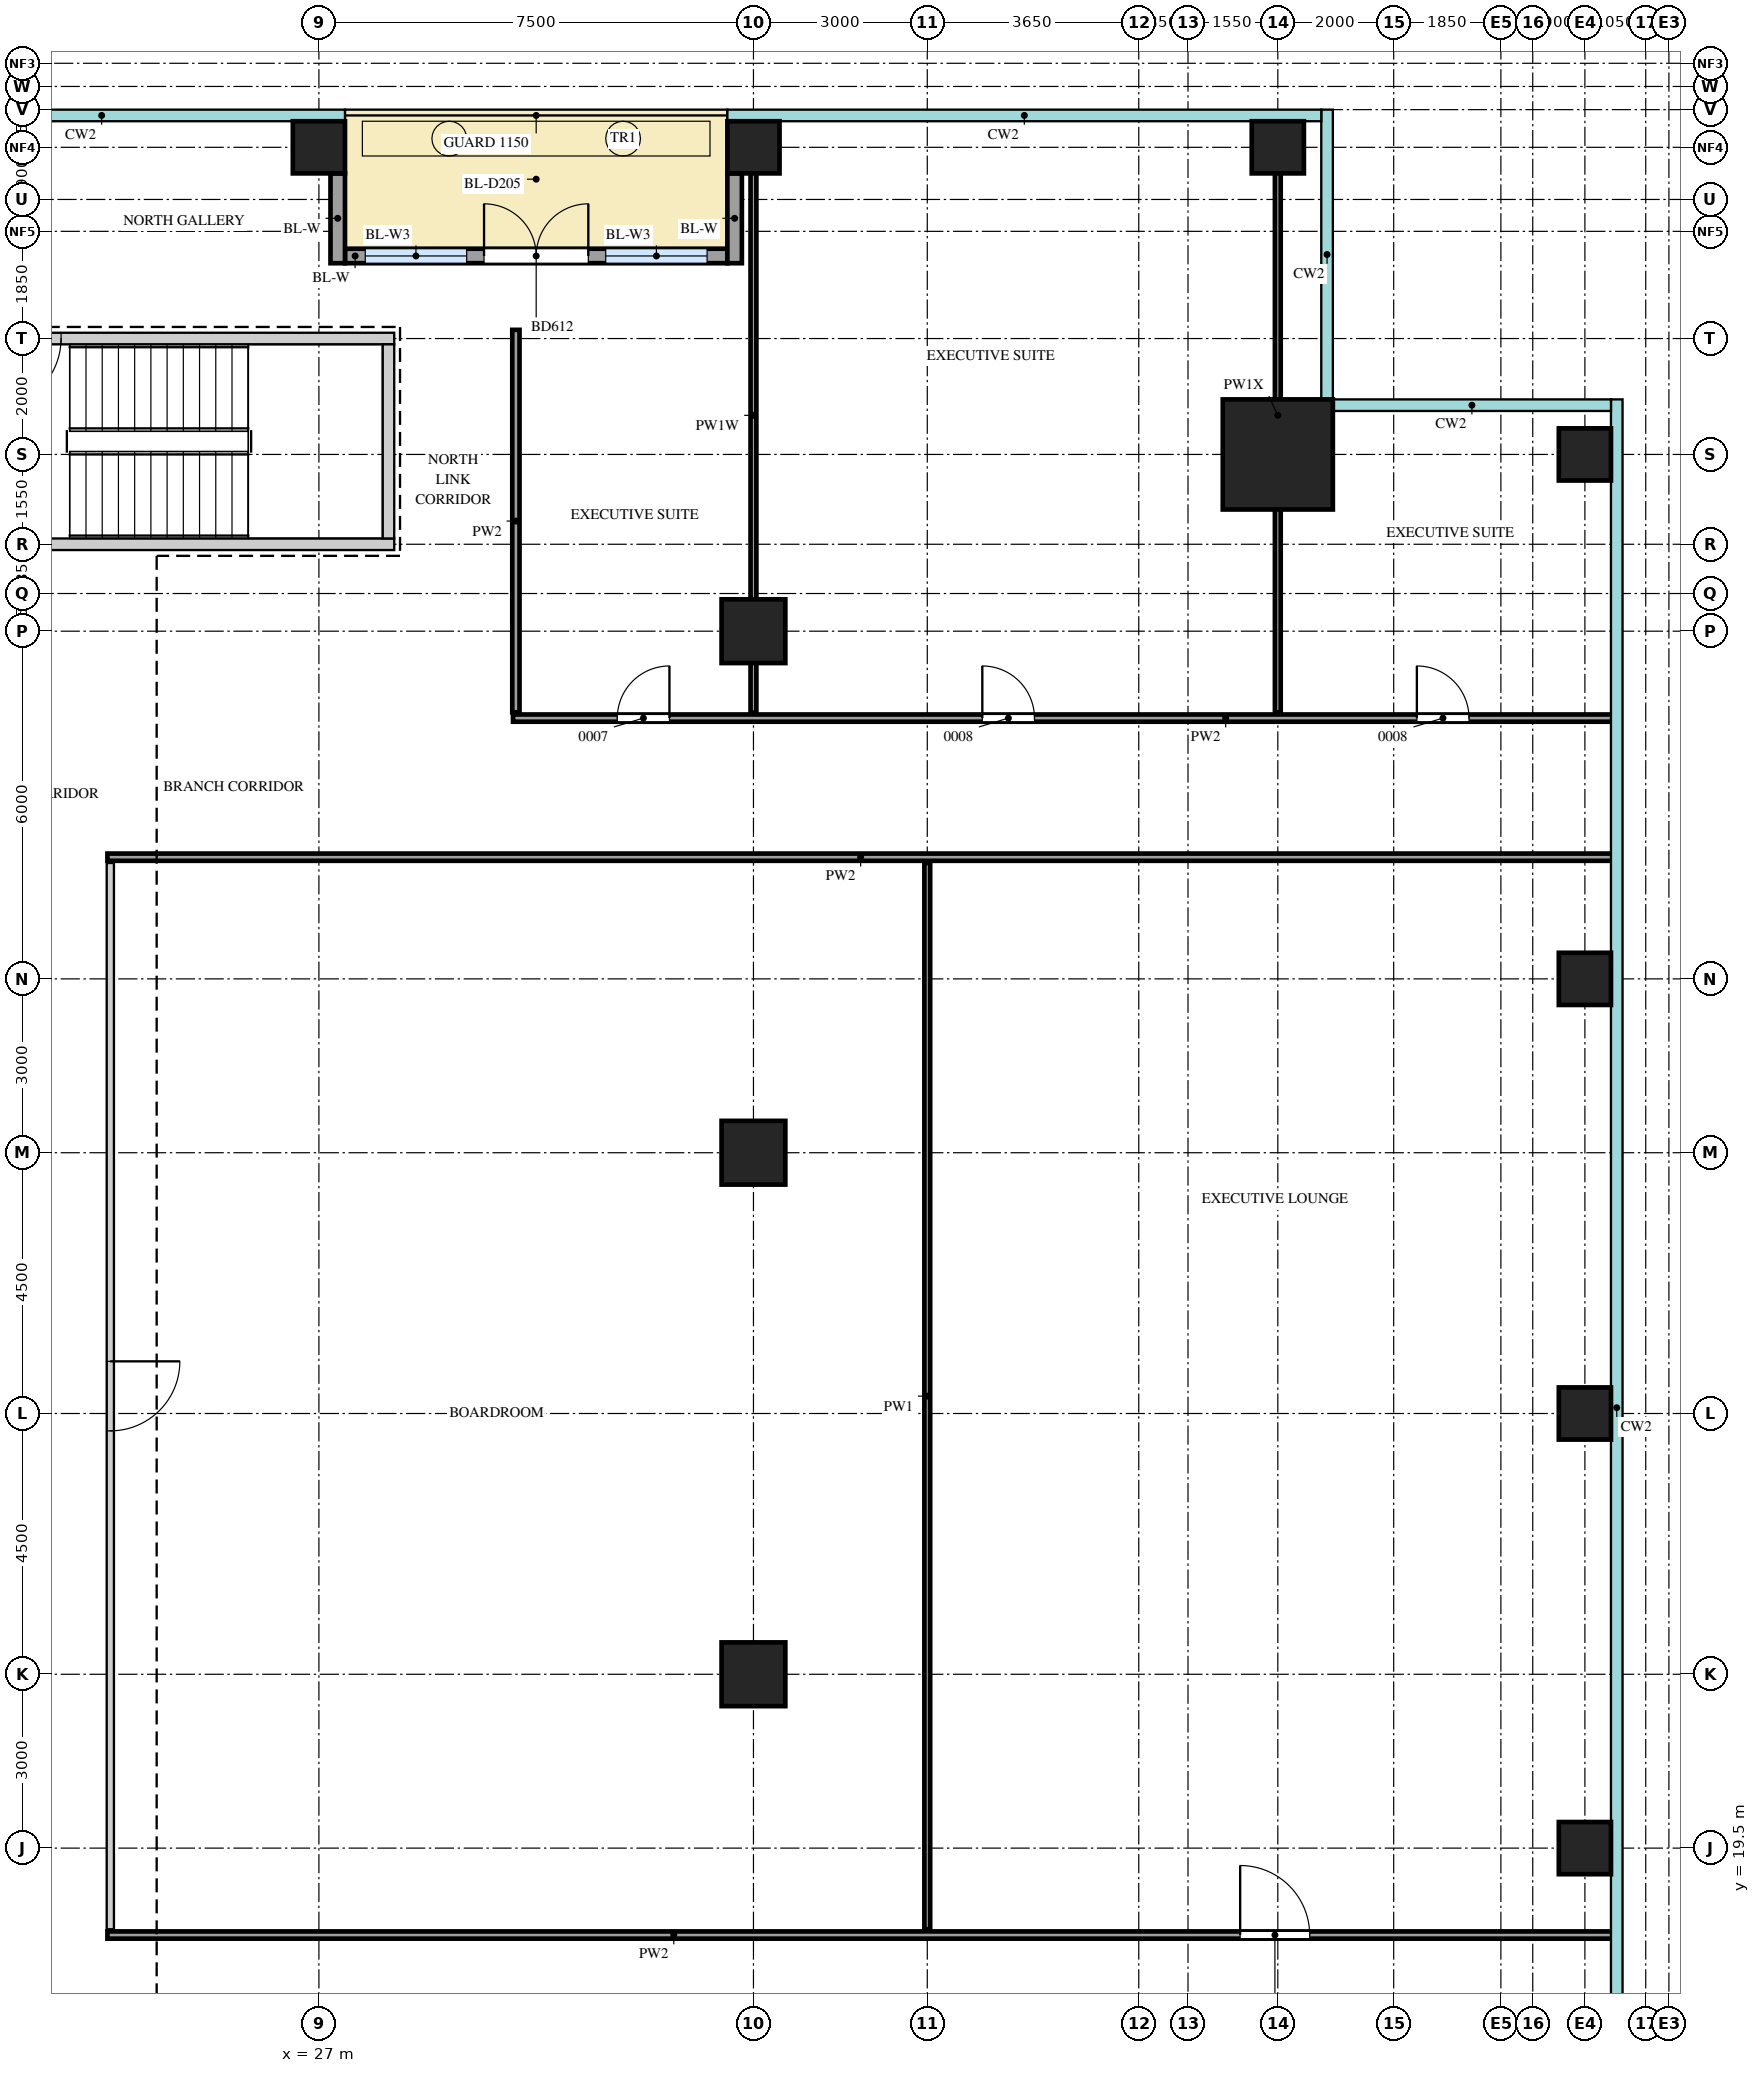
"""IFC4 building model, lengths in metres.
Left out: names, types, materials, properties, quantities, classifications, styles, units other than length and angle.
Written with IfcOpenShell. Run it as: python <this file> out.ifc"""

import sys

from ifc_helpers import new_model, si_unit, direction, frame, frame_2d, origin, origin_2d, place, context, subcontext, project, spatial, rectangle, extrude, source, transform, mapped, element, fill, save


model = new_model("IFC4")
c1 = context("Model", 3, precision=1e-05, world=origin(), true_north=direction((0.0, 1.0)))
c2 = subcontext(c1, "Body", "Model", "MODEL_VIEW")
j1 = project(units=[si_unit("LENGTHUNIT", "METRE"), si_unit("PLANEANGLEUNIT", "RADIAN")], contexts=[c1])
p1 = place(None, origin())
s1 = spatial("IfcSite", under=j1, at=p1, CompositionType="ELEMENT")
p2 = place(p1, origin())
s2 = spatial("IfcBuilding", under=s1, at=p2, CompositionType="ELEMENT")
p3 = place(p2, frame((0.0, 0.0, 270.2)))
s3 = spatial("IfcBuildingStorey", under=s2, at=p3, CompositionType="ELEMENT", Elevation=270.2)
m1 = source(origin(), c2, "Body", "SweptSolid", [
    extrude(rectangle(XDim=7.1, YDim=0.2, at=frame_2d((3.55, 0.0))), origin(), (0.0, 0.0, 1.0), 3.75),
])
p4 = place(p3, frame((21.2, 45.55, 0.0), z_axis=(0.0, 0.0, 1.0), x_axis=(1.0, 0.0, 0.0)))
e1 = element("IfcWall", 1, at=p4, inside=s3, PredefinedType="SHEAR", context=c2, shape_type="MappedRepresentation", body=[
    mapped(m1, transform((0.0, 0.0, 0.0))),
])
m2 = source(origin(), c2, "Body", "SweptSolid", [
    extrude(rectangle(XDim=1.2, YDim=2.1, at=frame_2d((0.6, 1.05))), frame((0.0, 0.11, 0.0), z_axis=(0.0, -1.0, 0.0), x_axis=(1.0, 0.0, 0.0)), (0.0, 0.0, 1.0), 0.22),
])
p5 = place(p4, frame((0.15, 0.0, 0.0)))
e2 = element("IfcOpeningElement", 2, at=p5, cuts=e1, PredefinedType="OPENING", context=c2, shape_type="MappedRepresentation", body=[
    mapped(m2, transform((0.0, 0.0, 0.0))),
])
p6 = place(p3, frame((21.2, 42.0, 0.0), z_axis=(0.0, 0.0, 1.0), x_axis=(1.0, 0.0, 0.0)))
e3 = element("IfcWall", 3, at=p6, inside=s3, PredefinedType="SHEAR", context=c2, shape_type="MappedRepresentation", body=[
    mapped(m1, transform((0.0, 0.0, 0.0))),
])
m3 = source(origin(), c2, "Body", "SweptSolid", [
    extrude(rectangle(XDim=3.35, YDim=0.2, at=frame_2d((1.675, 0.0))), origin(), (0.0, 0.0, 1.0), 3.75),
])
p7 = place(p3, frame((28.2, 42.1, 0.0), z_axis=(0.0, 0.0, 1.0), x_axis=(0.0, 1.0, 0.0)))
e4 = element("IfcWall", 4, at=p7, inside=s3, PredefinedType="SHEAR", context=c2, shape_type="MappedRepresentation", body=[
    mapped(m3, transform((0.0, 0.0, 0.0))),
])
m4 = source(origin(), c2, "Body", "SweptSolid", [
    extrude(rectangle(XDim=1.9, YDim=1.9, at=origin_2d()), origin(), (0.0, 0.0, 1.0), 4.0),
])
p8 = place(p3, frame((43.55, 43.55, 0.0), z_axis=(0.0, 0.0, 1.0), x_axis=(1.0, 0.0, 0.0)))
e5 = element("IfcColumn", 5, at=p8, inside=s3, PredefinedType="COLUMN", context=c2, shape_type="MappedRepresentation", body=[
    mapped(m4, transform((0.0, 0.0, 0.0))),
])
m5 = source(origin(), c2, "Body", "SweptSolid", [
    extrude(rectangle(XDim=0.9, YDim=0.9, at=origin_2d()), origin(), (0.0, 0.0, 1.0), 4.0),
])
for number, where, z_axis, x_axis in (
    (6, (48.85, 19.5, 0.0), (0.0, 0.0, 1.0), (1.0, 0.0, 0.0)),
    (7, (48.85, 27.0, 0.0), (0.0, 0.0, 1.0), (1.0, 0.0, 0.0)),
    (8, (48.85, 34.5, 0.0), (0.0, 0.0, 1.0), (1.0, 0.0, 0.0)),
    (9, (48.85, 43.55, 0.0), (0.0, 0.0, 1.0), (1.0, 0.0, 0.0)),
    (10, (27.0, 48.85, 0.0), (0.0, 0.0, 1.0), (1.0, 0.0, 0.0)),
    (11, (34.5, 48.85, 0.0), (0.0, 0.0, 1.0), (1.0, 0.0, 0.0)),
    (12, (43.55, 48.85, 0.0), (0.0, 0.0, 1.0), (1.0, 0.0, 0.0)),
):
    element("IfcColumn", number, at=place(p3, frame(where, z_axis=z_axis, x_axis=x_axis)), inside=s3, PredefinedType="COLUMN", context=c2, shape_type="MappedRepresentation", body=[
        mapped(m5, transform((0.0, 0.0, 0.0))),
    ])
m6 = source(origin(), c2, "Body", "SweptSolid", [
    extrude(rectangle(XDim=1.1, YDim=1.1, at=origin_2d()), origin(), (0.0, 0.0, 1.0), 4.0),
])
for number, where, z_axis, x_axis in (
    (13, (34.5, 22.5, 0.0), (0.0, 0.0, 1.0), (1.0, 0.0, 0.0)),
    (14, (34.5, 31.5, 0.0), (0.0, 0.0, 1.0), (1.0, 0.0, 0.0)),
    (15, (34.5, 40.5, 0.0), (0.0, 0.0, 1.0), (1.0, 0.0, 0.0)),
):
    element("IfcColumn", number, at=place(p3, frame(where, z_axis=z_axis, x_axis=x_axis)), inside=s3, PredefinedType="COLUMN", context=c2, shape_type="MappedRepresentation", body=[
        mapped(m6, transform((0.0, 0.0, 0.0))),
    ])
m7 = source(origin(), c2, "Body", "SweptSolid", [
    extrude(rectangle(XDim=6.6, YDim=0.25, at=frame_2d((3.3, 0.0))), origin(), (0.0, 0.0, 1.0), 3.75),
])
p9 = place(p3, frame((27.45, 46.975, 0.0), z_axis=(0.0, 0.0, 1.0), x_axis=(1.0, 0.0, 0.0)))
e16 = element("IfcWall", 16, at=p9, inside=s3, PredefinedType="SOLIDWALL", context=c2, shape_type="MappedRepresentation", body=[
    mapped(m7, transform((0.0, 0.0, 0.0))),
])
m8 = source(origin(), c2, "Body", "SweptSolid", [
    extrude(rectangle(XDim=1.75, YDim=2.4, at=frame_2d((0.875, 1.2))), frame((0.0, 0.135, 0.0), z_axis=(0.0, -1.0, 0.0), x_axis=(1.0, 0.0, 0.0)), (0.0, 0.0, 1.0), 0.27),
])
p10 = place(p9, frame((0.35, 0.0, 0.0)))
e17 = element("IfcOpeningElement", 17, at=p10, cuts=e16, PredefinedType="OPENING", context=c2, shape_type="MappedRepresentation", body=[
    mapped(m8, transform((0.0, 0.0, 0.0))),
])
p11 = place(p9, frame((4.5, 0.0, 0.0)))
e18 = element("IfcOpeningElement", 18, at=p11, cuts=e16, PredefinedType="OPENING", context=c2, shape_type="MappedRepresentation", body=[
    mapped(m8, transform((0.0, 0.0, 0.0))),
])
m9 = source(origin(), c2, "Body", "SweptSolid", [
    extrude(rectangle(XDim=1.8, YDim=2.4, at=frame_2d((0.9, 1.2))), frame((0.0, 0.135, 0.0), z_axis=(0.0, -1.0, 0.0), x_axis=(1.0, 0.0, 0.0)), (0.0, 0.0, 1.0), 0.27),
])
p12 = place(p9, frame((2.4, 0.0, 0.0)))
e19 = element("IfcOpeningElement", 19, at=p12, cuts=e16, PredefinedType="OPENING", context=c2, shape_type="MappedRepresentation", body=[
    mapped(m9, transform((0.0, 0.0, 0.0))),
])
m10 = source(origin(), c2, "Body", "SweptSolid", [
    extrude(rectangle(XDim=1.55, YDim=0.25, at=frame_2d((0.775, 0.0))), origin(), (0.0, 0.0, 1.0), 3.75),
])
for number, where, z_axis, x_axis in (
    (20, (27.325, 48.4, 0.0), (0.0, 0.0, 1.0), (0.0, -1.0, 0.0)),
    (21, (34.175, 48.4, 0.0), (0.0, 0.0, 1.0), (0.0, -1.0, 0.0)),
):
    element("IfcWall", number, at=place(p3, frame(where, z_axis=z_axis, x_axis=x_axis)), inside=s3, PredefinedType="SOLIDWALL", context=c2, shape_type="MappedRepresentation", body=[
        mapped(m10, transform((0.0, 0.0, 0.0))),
    ])
m11 = source(origin(), c2, "Body", "SweptSolid", [
    extrude(rectangle(XDim=26.0, YDim=0.125, at=frame_2d((13.0, 0.0))), origin(), (0.0, 0.0, 1.0), 3.8),
])
p13 = place(p3, frame((23.35, 18.0, 0.0), z_axis=(0.0, 0.0, 1.0), x_axis=(1.0, 0.0, 0.0)))
e22 = element("IfcWall", 22, at=p13, inside=s3, PredefinedType="PARTITIONING", context=c2, shape_type="MappedRepresentation", body=[
    mapped(m11, transform((0.0, 0.0, 0.0))),
])
m12 = source(origin(), c2, "Body", "SweptSolid", [
    extrude(rectangle(XDim=1.2, YDim=2.1, at=frame_2d((0.6, 1.05))), frame((0.0, 0.073, 0.0), z_axis=(0.0, -1.0, 0.0), x_axis=(1.0, 0.0, 0.0)), (0.0, 0.0, 1.0), 0.145),
])
p14 = place(p13, frame((19.55, 0.0, 0.0)))
e23 = element("IfcOpeningElement", 23, at=p14, cuts=e22, PredefinedType="OPENING", context=c2, shape_type="MappedRepresentation", body=[
    mapped(m12, transform((0.0, 0.0, 0.0))),
])
m13 = source(origin(), c2, "Body", "SweptSolid", [
    extrude(rectangle(XDim=18.4, YDim=0.125, at=frame_2d((9.2, 0.0))), origin(), (0.0, 0.0, 1.0), 3.8),
])
p15 = place(p3, frame((23.4, 18.1, 0.0), z_axis=(0.0, 0.0, 1.0), x_axis=(0.0, 1.0, 0.0)))
e24 = element("IfcWall", 24, at=p15, inside=s3, PredefinedType="PARTITIONING", context=c2, shape_type="MappedRepresentation", body=[
    mapped(m13, transform((0.0, 0.0, 0.0))),
])
p16 = place(p15, frame((8.6, 0.0, 0.0)))
e25 = element("IfcOpeningElement", 25, at=p16, cuts=e24, PredefinedType="OPENING", context=c2, shape_type="MappedRepresentation", body=[
    mapped(m12, transform((0.0, 0.0, 0.0))),
])
m14 = source(origin(), c2, "Body", "SweptSolid", [
    extrude(rectangle(XDim=18.4, YDim=0.1, at=frame_2d((9.2, 0.0))), origin(), (0.0, 0.0, 1.0), 3.8),
])
p17 = place(p3, frame((37.5, 18.1, 0.0), z_axis=(0.0, 0.0, 1.0), x_axis=(0.0, 1.0, 0.0)))
e26 = element("IfcWall", 26, at=p17, inside=s3, PredefinedType="PARTITIONING", context=c2, shape_type="MappedRepresentation", body=[
    mapped(m14, transform((0.0, 0.0, 0.0))),
])
p18 = place(p3, frame((23.35, 36.6, 0.0), z_axis=(0.0, 0.0, 1.0), x_axis=(1.0, 0.0, 0.0)))
e27 = element("IfcWall", 27, at=p18, inside=s3, PredefinedType="PARTITIONING", context=c2, shape_type="MappedRepresentation", body=[
    mapped(m11, transform((0.0, 0.0, 0.0))),
])
m15 = source(origin(), c2, "Body", "SweptSolid", [
    extrude(rectangle(XDim=19.0, YDim=0.125, at=frame_2d((9.5, 0.0))), origin(), (0.0, 0.0, 1.0), 3.8),
])
p19 = place(p3, frame((30.35, 39.0, 0.0), z_axis=(0.0, 0.0, 1.0), x_axis=(1.0, 0.0, 0.0)))
e28 = element("IfcWall", 28, at=p19, inside=s3, PredefinedType="PARTITIONING", context=c2, shape_type="MappedRepresentation", body=[
    mapped(m15, transform((0.0, 0.0, 0.0))),
])
m16 = source(origin(), c2, "Body", "SweptSolid", [
    extrude(rectangle(XDim=0.9, YDim=2.1, at=frame_2d((0.45, 1.05))), frame((0.0, 0.073, 0.0), z_axis=(0.0, -1.0, 0.0), x_axis=(1.0, 0.0, 0.0)), (0.0, 0.0, 1.0), 0.145),
])
p20 = place(p19, frame((1.8, 0.0, 0.0)))
e29 = element("IfcOpeningElement", 29, at=p20, cuts=e28, PredefinedType="OPENING", context=c2, shape_type="MappedRepresentation", body=[
    mapped(m16, transform((0.0, 0.0, 0.0))),
])
p21 = place(p19, frame((8.1, 0.0, 0.0)))
e30 = element("IfcOpeningElement", 30, at=p21, cuts=e28, PredefinedType="OPENING", context=c2, shape_type="MappedRepresentation", body=[
    mapped(m16, transform((0.0, 0.0, 0.0))),
])
p22 = place(p19, frame((15.6, 0.0, 0.0)))
e31 = element("IfcOpeningElement", 31, at=p22, cuts=e28, PredefinedType="OPENING", context=c2, shape_type="MappedRepresentation", body=[
    mapped(m16, transform((0.0, 0.0, 0.0))),
])
m17 = source(origin(), c2, "Body", "SweptSolid", [
    extrude(rectangle(XDim=6.6, YDim=0.125, at=frame_2d((3.3, 0.0))), origin(), (0.0, 0.0, 1.0), 3.8),
])
p23 = place(p3, frame((30.4, 39.1, 0.0), z_axis=(0.0, 0.0, 1.0), x_axis=(0.0, 1.0, 0.0)))
e32 = element("IfcWall", 32, at=p23, inside=s3, PredefinedType="PARTITIONING", context=c2, shape_type="MappedRepresentation", body=[
    mapped(m17, transform((0.0, 0.0, 0.0))),
])
m18 = source(origin(), c2, "Body", "SweptSolid", [
    extrude(rectangle(XDim=10.25, YDim=0.1, at=frame_2d((5.125, 0.0))), origin(), (0.0, 0.0, 1.0), 3.2),
])
p24 = place(p3, frame((34.5, 39.1, 0.0), z_axis=(0.0, 0.0, 1.0), x_axis=(0.0, 1.0, 0.0)))
e33 = element("IfcWall", 33, at=p24, inside=s3, PredefinedType="PARTITIONING", context=c2, shape_type="MappedRepresentation", body=[
    mapped(m18, transform((0.0, 0.0, 0.0))),
])
m19 = source(origin(), c2, "Body", "SweptSolid", [
    extrude(rectangle(XDim=10.25, YDim=0.1, at=frame_2d((5.125, 0.0))), origin(), (0.0, 0.0, 1.0), 3.15),
])
p25 = place(p3, frame((43.55, 39.1, 0.0), z_axis=(0.0, 0.0, 1.0), x_axis=(0.0, 1.0, 0.0)))
e34 = element("IfcWall", 34, at=p25, inside=s3, PredefinedType="PARTITIONING", context=c2, shape_type="MappedRepresentation", body=[
    mapped(m19, transform((0.0, 0.0, 0.0))),
])
m20 = source(origin(), c2, "Body", "SweptSolid", [
    extrude(rectangle(XDim=1.75, YDim=2.4, at=frame_2d((0.875, 1.2))), frame((0.0, 0.03, 0.0), z_axis=(0.0, -1.0, 0.0), x_axis=(1.0, 0.0, 0.0)), (0.0, 0.0, 1.0), 0.06),
])
p26 = place(p10, origin())
e35 = element("IfcWindow", 35, at=p26, inside=s3, PartitioningType="SINGLE_PANEL", PredefinedType="WINDOW", context=c2, shape_type="MappedRepresentation", body=[
    mapped(m20, transform((0.0, 0.0, 0.0))),
])
fill(e17, e35)
p27 = place(p11, origin())
e36 = element("IfcWindow", 36, at=p27, inside=s3, PartitioningType="SINGLE_PANEL", PredefinedType="WINDOW", context=c2, shape_type="MappedRepresentation", body=[
    mapped(m20, transform((0.0, 0.0, 0.0))),
])
fill(e18, e36)
m21 = source(origin(), c2, "Body", "SweptSolid", [
    extrude(rectangle(XDim=1.8, YDim=2.4, at=frame_2d((0.9, 1.2))), frame((0.0, 0.025, 0.0), z_axis=(0.0, -1.0, 0.0), x_axis=(1.0, 0.0, 0.0)), (0.0, 0.0, 1.0), 0.05),
])
p28 = place(p12, origin())
e37 = element("IfcDoor", 37, at=p28, inside=s3, OperationType="DOUBLE_DOOR_DOUBLE_SWING", PredefinedType="DOOR", context=c2, shape_type="MappedRepresentation", body=[
    mapped(m21, transform((0.0, 0.0, 0.0))),
])
fill(e19, e37)
m22 = source(origin(), c2, "Body", "SweptSolid", [
    extrude(rectangle(XDim=1.2, YDim=2.1, at=frame_2d((0.6, 1.05))), frame((0.0, 0.025, 0.0), z_axis=(0.0, -1.0, 0.0), x_axis=(1.0, 0.0, 0.0)), (0.0, 0.0, 1.0), 0.05),
])
p29 = place(p16, origin())
e38 = element("IfcDoor", 38, at=p29, inside=s3, OperationType="SINGLE_SWING_RIGHT", PredefinedType="DOOR", context=c2, shape_type="MappedRepresentation", body=[
    mapped(m22, transform((0.0, 0.0, 0.0))),
])
fill(e25, e38)
p30 = place(p14, origin())
e39 = element("IfcDoor", 39, at=p30, inside=s3, OperationType="SINGLE_SWING_RIGHT", PredefinedType="DOOR", context=c2, shape_type="MappedRepresentation", body=[
    mapped(m22, transform((0.0, 0.0, 0.0))),
])
fill(e23, e39)
m23 = source(origin(), c2, "Body", "SweptSolid", [
    extrude(rectangle(XDim=0.9, YDim=2.1, at=frame_2d((0.45, 1.05))), frame((0.0, 0.025, 0.0), z_axis=(0.0, -1.0, 0.0), x_axis=(1.0, 0.0, 0.0)), (0.0, 0.0, 1.0), 0.05),
])
p31 = place(p20, origin())
e40 = element("IfcDoor", 40, at=p31, inside=s3, OperationType="SINGLE_SWING_LEFT", PredefinedType="DOOR", context=c2, shape_type="MappedRepresentation", body=[
    mapped(m23, transform((0.0, 0.0, 0.0))),
])
fill(e29, e40)
p32 = place(p21, origin())
e41 = element("IfcDoor", 41, at=p32, inside=s3, OperationType="SINGLE_SWING_RIGHT", PredefinedType="DOOR", context=c2, shape_type="MappedRepresentation", body=[
    mapped(m23, transform((0.0, 0.0, 0.0))),
])
fill(e30, e41)
p33 = place(p22, origin())
e42 = element("IfcDoor", 42, at=p33, inside=s3, OperationType="SINGLE_SWING_RIGHT", PredefinedType="DOOR", context=c2, shape_type="MappedRepresentation", body=[
    mapped(m23, transform((0.0, 0.0, 0.0))),
])
fill(e31, e42)
p34 = place(p5, origin())
e43 = element("IfcDoor", 43, at=p34, inside=s3, OperationType="SINGLE_SWING_LEFT", PredefinedType="DOOR", context=c2, shape_type="MappedRepresentation", body=[
    mapped(m22, transform((0.0, 0.0, 0.0))),
])
fill(e2, e43)
save(model, sys.argv[1])
